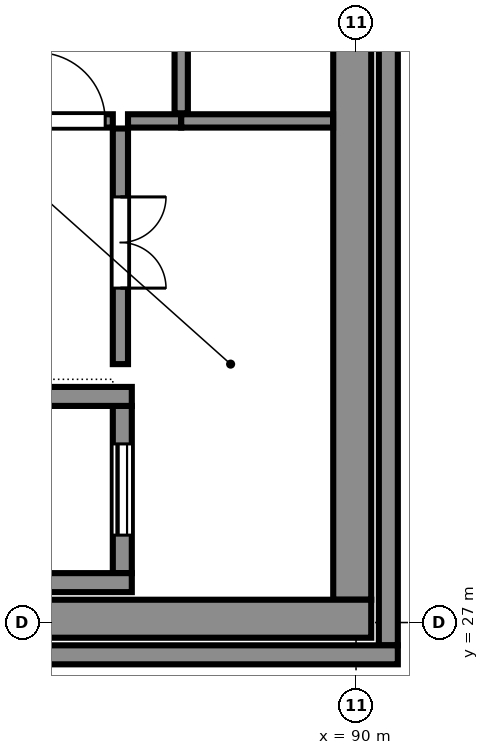
"""IFC4 building model, lengths in metres.
Left out: names, types, materials, properties, quantities, classifications, styles, units other than length and angle.
Written with IfcOpenShell. Run it as: python <this file> out.ifc"""

import sys

from ifc_helpers import new_model, si_unit, direction, frame, frame_2d, origin, place, context, subcontext, project, spatial, polyline, rectangle, outline, extrude, element, fill, save


model = new_model("IFC4")
c1 = context("Model", 3, precision=1e-05, world=origin(), true_north=direction((0.0, 1.0)))
c2 = subcontext(c1, "Body", "Model", "MODEL_VIEW")
j1 = project(units=[si_unit("LENGTHUNIT", "METRE"), si_unit("PLANEANGLEUNIT", "RADIAN")], contexts=[c1])
p1 = place(None, origin())
s1 = spatial("IfcSite", under=j1, at=p1, CompositionType="ELEMENT")
p2 = place(p1, origin())
s2 = spatial("IfcBuilding", under=s1, at=p2, CompositionType="ELEMENT")
p3 = place(p2, frame((0.0, 0.0, 11.7)))
s3 = spatial("IfcBuildingStorey", under=s2, at=p3, CompositionType="ELEMENT", Elevation=11.7)
p4 = place(p3, frame((71.8, 27.05, 0.0), z_axis=(0.0, 0.0, 1.0), x_axis=(1.0, 0.0, 0.0)))
e1 = element("IfcWall", 1, at=p4, inside=s3, PredefinedType="SOLIDWALL", context=c2, shape_type="SweptSolid", body=[
    extrude(rectangle(XDim=18.4, YDim=0.5, at=frame_2d((9.2, 0.0))), origin(), (0.0, 0.0, 1.0), 4.2),
])
p5 = place(p3, frame((89.95, 27.3, 0.0), z_axis=(0.0, 0.0, 1.0), x_axis=(0.0, 1.0, 0.0)))
e2 = element("IfcWall", 2, at=p5, inside=s3, PredefinedType="SOLIDWALL", context=c2, shape_type="SweptSolid", body=[
    extrude(rectangle(XDim=8.4, YDim=0.5, at=frame_2d((4.2, 0.0))), origin(), (0.0, 0.0, 1.0), 4.2),
])
p6 = place(p3, frame((71.45, 26.575, 0.0), z_axis=(0.0, 0.0, 1.0), x_axis=(1.0, 0.0, 0.0)))
e3 = element("IfcWall", 3, at=p6, inside=s3, PredefinedType="SOLIDWALL", context=c2, shape_type="SweptSolid", body=[
    extrude(outline(polyline([(0.0, 0.0), (19.1, 0.0), (19.1, 12.6), (0.0, 12.6), (0.0, 0.0)]), holes=[polyline([(1.308, 2.439), (1.352, 2.546), (1.408, 2.646), (1.475, 2.74), (1.552, 2.826), (1.638, 2.903), (1.732, 2.969), (1.833, 3.025), (1.939, 3.068), (2.05, 3.1), (2.161, 3.068), (2.267, 3.025), (2.368, 2.969), (2.462, 2.903), (2.549, 2.826), (2.625, 2.74), (2.692, 2.646), (2.748, 2.546), (2.792, 2.439), (2.824, 2.329), (2.844, 2.215), (2.85, 2.1), (2.85, 0.6), (1.25, 0.6), (1.25, 2.1), (1.257, 2.215), (1.276, 2.329), (1.308, 2.439)]), polyline([(4.308, 2.439), (4.352, 2.546), (4.408, 2.646), (4.475, 2.74), (4.552, 2.826), (4.638, 2.903), (4.732, 2.969), (4.833, 3.025), (4.939, 3.068), (5.05, 3.1), (5.161, 3.068), (5.267, 3.025), (5.368, 2.969), (5.462, 2.903), (5.549, 2.826), (5.625, 2.74), (5.692, 2.646), (5.748, 2.546), (5.792, 2.439), (5.824, 2.329), (5.844, 2.215), (5.85, 2.1), (5.85, 0.6), (4.25, 0.6), (4.25, 2.1), (4.257, 2.215), (4.276, 2.329), (4.308, 2.439)]), polyline([(7.308, 2.439), (7.352, 2.546), (7.408, 2.646), (7.475, 2.74), (7.552, 2.826), (7.638, 2.903), (7.732, 2.969), (7.833, 3.025), (7.939, 3.068), (8.05, 3.1), (8.161, 3.068), (8.267, 3.025), (8.368, 2.969), (8.462, 2.903), (8.549, 2.826), (8.625, 2.74), (8.692, 2.646), (8.748, 2.546), (8.792, 2.439), (8.824, 2.329), (8.844, 2.215), (8.85, 2.1), (8.85, 0.6), (7.25, 0.6), (7.25, 2.1), (7.257, 2.215), (7.276, 2.329), (7.308, 2.439)]), polyline([(1.308, 6.639), (1.352, 6.746), (1.408, 6.846), (1.475, 6.94), (1.552, 7.026), (1.638, 7.103), (1.732, 7.169), (1.833, 7.225), (1.939, 7.269), (2.05, 7.3), (2.161, 7.269), (2.267, 7.225), (2.368, 7.169), (2.462, 7.103), (2.549, 7.026), (2.625, 6.94), (2.692, 6.846), (2.748, 6.746), (2.792, 6.639), (2.824, 6.529), (2.844, 6.415), (2.85, 6.3), (2.85, 4.8), (1.25, 4.8), (1.25, 6.3), (1.257, 6.415), (1.276, 6.529), (1.308, 6.639)]), polyline([(4.308, 6.639), (4.352, 6.746), (4.408, 6.846), (4.475, 6.94), (4.552, 7.026), (4.638, 7.103), (4.732, 7.169), (4.833, 7.225), (4.939, 7.269), (5.05, 7.3), (5.161, 7.269), (5.267, 7.225), (5.368, 7.169), (5.462, 7.103), (5.549, 7.026), (5.625, 6.94), (5.692, 6.846), (5.748, 6.746), (5.792, 6.639), (5.824, 6.529), (5.844, 6.415), (5.85, 6.3), (5.85, 4.8), (4.25, 4.8), (4.25, 6.3), (4.257, 6.415), (4.276, 6.529), (4.308, 6.639)]), polyline([(7.308, 6.639), (7.352, 6.746), (7.408, 6.846), (7.475, 6.94), (7.552, 7.026), (7.638, 7.103), (7.732, 7.169), (7.833, 7.225), (7.939, 7.269), (8.05, 7.3), (8.161, 7.269), (8.267, 7.225), (8.368, 7.169), (8.462, 7.103), (8.549, 7.026), (8.625, 6.94), (8.692, 6.846), (8.748, 6.746), (8.792, 6.639), (8.824, 6.529), (8.844, 6.415), (8.85, 6.3), (8.85, 4.8), (7.25, 4.8), (7.25, 6.3), (7.257, 6.415), (7.276, 6.529), (7.308, 6.639)]), polyline([(1.308, 10.839), (1.352, 10.946), (1.408, 11.046), (1.475, 11.14), (1.552, 11.226), (1.638, 11.303), (1.732, 11.369), (1.833, 11.425), (1.939, 11.469), (2.05, 11.5), (2.161, 11.469), (2.267, 11.425), (2.368, 11.369), (2.462, 11.303), (2.549, 11.226), (2.625, 11.14), (2.692, 11.046), (2.748, 10.946), (2.792, 10.839), (2.824, 10.729), (2.844, 10.615), (2.85, 10.5), (2.85, 9.0), (1.25, 9.0), (1.25, 10.5), (1.257, 10.615), (1.276, 10.729), (1.308, 10.839)]), polyline([(4.352, 10.946), (4.408, 11.046), (4.475, 11.14), (4.552, 11.226), (4.638, 11.303), (4.732, 11.369), (4.833, 11.425), (4.939, 11.469), (5.05, 11.5), (5.161, 11.469), (5.267, 11.425), (5.368, 11.369), (5.462, 11.303), (5.549, 11.226), (5.625, 11.14), (5.692, 11.046), (5.748, 10.946), (5.792, 10.839), (5.824, 10.729), (5.844, 10.615), (5.85, 10.5), (5.85, 9.0), (4.25, 9.0), (4.25, 10.5), (4.257, 10.615), (4.276, 10.729), (4.308, 10.839), (4.352, 10.946)]), polyline([(7.352, 10.946), (7.408, 11.046), (7.475, 11.14), (7.552, 11.226), (7.638, 11.303), (7.732, 11.369), (7.833, 11.425), (7.939, 11.469), (8.05, 11.5), (8.161, 11.469), (8.267, 11.425), (8.368, 11.369), (8.462, 11.303), (8.549, 11.226), (8.625, 11.14), (8.692, 11.046), (8.748, 10.946), (8.792, 10.839), (8.824, 10.729), (8.844, 10.615), (8.85, 10.5), (8.85, 9.0), (7.25, 9.0), (7.25, 10.5), (7.257, 10.615), (7.276, 10.729), (7.308, 10.839), (7.352, 10.946)]), polyline([(10.308, 2.439), (10.352, 2.546), (10.408, 2.646), (10.475, 2.74), (10.552, 2.826), (10.638, 2.903), (10.732, 2.969), (10.833, 3.025), (10.939, 3.068), (11.05, 3.1), (11.161, 3.068), (11.267, 3.025), (11.368, 2.969), (11.462, 2.903), (11.549, 2.826), (11.625, 2.74), (11.692, 2.646), (11.748, 2.546), (11.792, 2.439), (11.824, 2.329), (11.844, 2.215), (11.85, 2.1), (11.85, 0.6), (10.25, 0.6), (10.25, 2.1), (10.257, 2.215), (10.276, 2.329), (10.308, 2.439)]), polyline([(13.308, 2.439), (13.352, 2.546), (13.408, 2.646), (13.475, 2.74), (13.552, 2.826), (13.638, 2.903), (13.732, 2.969), (13.833, 3.025), (13.939, 3.068), (14.05, 3.1), (14.161, 3.068), (14.267, 3.025), (14.368, 2.969), (14.462, 2.903), (14.549, 2.826), (14.625, 2.74), (14.692, 2.646), (14.748, 2.546), (14.792, 2.439), (14.824, 2.329), (14.844, 2.215), (14.85, 2.1), (14.85, 0.6), (13.25, 0.6), (13.25, 2.1), (13.257, 2.215), (13.276, 2.329), (13.308, 2.439)]), polyline([(16.308, 2.439), (16.352, 2.546), (16.408, 2.646), (16.475, 2.74), (16.552, 2.826), (16.638, 2.903), (16.732, 2.969), (16.833, 3.025), (16.939, 3.068), (17.05, 3.1), (17.161, 3.068), (17.267, 3.025), (17.368, 2.969), (17.462, 2.903), (17.549, 2.826), (17.625, 2.74), (17.692, 2.646), (17.748, 2.546), (17.792, 2.439), (17.824, 2.329), (17.844, 2.215), (17.85, 2.1), (17.85, 0.6), (16.25, 0.6), (16.25, 2.1), (16.257, 2.215), (16.276, 2.329), (16.308, 2.439)]), polyline([(10.308, 6.639), (10.352, 6.746), (10.408, 6.846), (10.475, 6.94), (10.552, 7.026), (10.638, 7.103), (10.732, 7.169), (10.833, 7.225), (10.939, 7.269), (11.05, 7.3), (11.161, 7.269), (11.267, 7.225), (11.368, 7.169), (11.462, 7.103), (11.549, 7.026), (11.625, 6.94), (11.692, 6.846), (11.748, 6.746), (11.792, 6.639), (11.824, 6.529), (11.844, 6.415), (11.85, 6.3), (11.85, 4.8), (10.25, 4.8), (10.25, 6.3), (10.257, 6.415), (10.276, 6.529), (10.308, 6.639)]), polyline([(13.308, 6.639), (13.352, 6.746), (13.408, 6.846), (13.475, 6.94), (13.552, 7.026), (13.638, 7.103), (13.732, 7.169), (13.833, 7.225), (13.939, 7.269), (14.05, 7.3), (14.161, 7.269), (14.267, 7.225), (14.368, 7.169), (14.462, 7.103), (14.549, 7.026), (14.625, 6.94), (14.692, 6.846), (14.748, 6.746), (14.792, 6.639), (14.824, 6.529), (14.844, 6.415), (14.85, 6.3), (14.85, 4.8), (13.25, 4.8), (13.25, 6.3), (13.257, 6.415), (13.276, 6.529), (13.308, 6.639)]), polyline([(16.308, 6.639), (16.352, 6.746), (16.408, 6.846), (16.475, 6.94), (16.552, 7.026), (16.638, 7.103), (16.732, 7.169), (16.833, 7.225), (16.939, 7.269), (17.05, 7.3), (17.161, 7.269), (17.267, 7.225), (17.368, 7.169), (17.462, 7.103), (17.549, 7.026), (17.625, 6.94), (17.692, 6.846), (17.748, 6.746), (17.792, 6.639), (17.824, 6.529), (17.844, 6.415), (17.85, 6.3), (17.85, 4.8), (16.25, 4.8), (16.25, 6.3), (16.257, 6.415), (16.276, 6.529), (16.308, 6.639)]), polyline([(10.308, 10.839), (10.352, 10.946), (10.408, 11.046), (10.475, 11.14), (10.552, 11.226), (10.638, 11.303), (10.732, 11.369), (10.833, 11.425), (10.939, 11.469), (11.05, 11.5), (11.161, 11.469), (11.267, 11.425), (11.368, 11.369), (11.462, 11.303), (11.549, 11.226), (11.625, 11.14), (11.692, 11.046), (11.748, 10.946), (11.792, 10.839), (11.824, 10.729), (11.844, 10.615), (11.85, 10.5), (11.85, 9.0), (10.25, 9.0), (10.25, 10.5), (10.257, 10.615), (10.276, 10.729), (10.308, 10.839)]), polyline([(13.352, 10.946), (13.408, 11.046), (13.475, 11.14), (13.552, 11.226), (13.638, 11.303), (13.732, 11.369), (13.833, 11.425), (13.939, 11.469), (14.05, 11.5), (14.161, 11.469), (14.267, 11.425), (14.368, 11.369), (14.462, 11.303), (14.549, 11.226), (14.625, 11.14), (14.692, 11.046), (14.748, 10.946), (14.792, 10.839), (14.824, 10.729), (14.844, 10.615), (14.85, 10.5), (14.85, 9.0), (13.25, 9.0), (13.25, 10.5), (13.257, 10.615), (13.276, 10.729), (13.308, 10.839), (13.352, 10.946)]), polyline([(16.352, 10.946), (16.408, 11.046), (16.475, 11.14), (16.552, 11.226), (16.638, 11.303), (16.732, 11.369), (16.833, 11.425), (16.939, 11.469), (17.05, 11.5), (17.161, 11.469), (17.267, 11.425), (17.368, 11.369), (17.462, 11.303), (17.549, 11.226), (17.625, 11.14), (17.692, 11.046), (17.748, 10.946), (17.792, 10.839), (17.824, 10.729), (17.844, 10.615), (17.85, 10.5), (17.85, 9.0), (16.25, 9.0), (16.25, 10.5), (16.257, 10.615), (16.276, 10.729), (16.308, 10.839), (16.352, 10.946)])]), frame((0.0, 0.125, 0.0), z_axis=(0.0, -1.0, 0.0), x_axis=(1.0, 0.0, 0.0)), (0.0, 0.0, 1.0), 0.25),
])
p7 = place(p3, frame((90.425, 26.7, 0.0), z_axis=(0.0, 0.0, 1.0), x_axis=(0.0, 1.0, 0.0)))
e4 = element("IfcWall", 4, at=p7, inside=s3, PredefinedType="SOLIDWALL", context=c2, shape_type="SweptSolid", body=[
    extrude(outline(polyline([(0.0, 0.0), (8.7, 0.0), (8.7, 12.6), (0.0, 12.6), (0.0, 0.0)]), holes=[polyline([(2.056, 2.215), (2.076, 2.329), (2.108, 2.439), (2.152, 2.546), (2.208, 2.646), (2.275, 2.74), (2.352, 2.826), (2.438, 2.903), (2.532, 2.969), (2.633, 3.025), (2.739, 3.068), (2.85, 3.1), (2.961, 3.068), (3.067, 3.025), (3.168, 2.969), (3.262, 2.903), (3.348, 2.826), (3.425, 2.74), (3.492, 2.646), (3.548, 2.546), (3.592, 2.439), (3.624, 2.329), (3.644, 2.215), (3.65, 2.1), (3.65, 0.6), (2.05, 0.6), (2.05, 2.1), (2.056, 2.215)]), polyline([(5.076, 2.329), (5.108, 2.439), (5.152, 2.546), (5.208, 2.646), (5.275, 2.74), (5.352, 2.826), (5.438, 2.903), (5.532, 2.969), (5.633, 3.025), (5.739, 3.068), (5.85, 3.1), (5.961, 3.068), (6.067, 3.025), (6.168, 2.969), (6.262, 2.903), (6.348, 2.826), (6.425, 2.74), (6.492, 2.646), (6.548, 2.546), (6.592, 2.439), (6.624, 2.329), (6.644, 2.215), (6.65, 2.1), (6.65, 0.6), (5.05, 0.6), (5.05, 2.1), (5.056, 2.215), (5.076, 2.329)]), polyline([(2.076, 6.529), (2.108, 6.639), (2.152, 6.746), (2.208, 6.846), (2.275, 6.94), (2.352, 7.026), (2.438, 7.103), (2.532, 7.169), (2.633, 7.225), (2.739, 7.269), (2.85, 7.3), (2.961, 7.269), (3.067, 7.225), (3.168, 7.169), (3.262, 7.103), (3.348, 7.026), (3.425, 6.94), (3.492, 6.846), (3.548, 6.746), (3.592, 6.639), (3.624, 6.529), (3.644, 6.415), (3.65, 6.3), (3.65, 4.8), (2.05, 4.8), (2.05, 6.3), (2.056, 6.415), (2.076, 6.529)]), polyline([(5.056, 6.415), (5.076, 6.529), (5.108, 6.639), (5.152, 6.746), (5.208, 6.846), (5.275, 6.94), (5.352, 7.026), (5.438, 7.103), (5.532, 7.169), (5.633, 7.225), (5.739, 7.269), (5.85, 7.3), (5.961, 7.269), (6.067, 7.225), (6.168, 7.169), (6.262, 7.103), (6.348, 7.026), (6.425, 6.94), (6.492, 6.846), (6.548, 6.746), (6.592, 6.639), (6.624, 6.529), (6.644, 6.415), (6.65, 6.3), (6.65, 4.8), (5.05, 4.8), (5.05, 6.3), (5.056, 6.415)]), polyline([(2.076, 10.729), (2.108, 10.839), (2.152, 10.946), (2.208, 11.046), (2.275, 11.14), (2.352, 11.226), (2.438, 11.303), (2.532, 11.369), (2.633, 11.425), (2.739, 11.469), (2.85, 11.5), (2.961, 11.469), (3.067, 11.425), (3.168, 11.369), (3.262, 11.303), (3.348, 11.226), (3.425, 11.14), (3.492, 11.046), (3.548, 10.946), (3.592, 10.839), (3.624, 10.729), (3.644, 10.615), (3.65, 10.5), (3.65, 9.0), (2.05, 9.0), (2.05, 10.5), (2.056, 10.615), (2.076, 10.729)]), polyline([(5.076, 10.729), (5.108, 10.839), (5.152, 10.946), (5.208, 11.046), (5.275, 11.14), (5.352, 11.226), (5.438, 11.303), (5.532, 11.369), (5.633, 11.425), (5.739, 11.469), (5.85, 11.5), (5.961, 11.469), (6.067, 11.425), (6.168, 11.369), (6.262, 11.303), (6.348, 11.226), (6.425, 11.14), (6.492, 11.046), (6.548, 10.946), (6.592, 10.839), (6.624, 10.729), (6.644, 10.615), (6.65, 10.5), (6.65, 9.0), (5.05, 9.0), (5.05, 10.5), (5.056, 10.615), (5.076, 10.729)])]), frame((0.0, 0.125, 0.0), z_axis=(0.0, -1.0, 0.0), x_axis=(1.0, 0.0, 0.0)), (0.0, 0.0, 1.0), 0.25),
])
for number, where, z_axis, x_axis in (
    (5, (83.65, 27.525, 0.0), (0.0, 0.0, 1.0), (1.0, 0.0, 0.0)),
    (6, (83.65, 29.975, 0.0), (0.0, 0.0, 1.0), (1.0, 0.0, 0.0)),
):
    element("IfcWall", number, at=place(p3, frame(where, z_axis=z_axis, x_axis=x_axis)), inside=s3, PredefinedType="SOLIDWALL", context=c2, shape_type="SweptSolid", body=[
        extrude(rectangle(XDim=3.4, YDim=0.25, at=frame_2d((1.7, 0.0))), origin(), (0.0, 0.0, 1.0), 3.516),
    ])
p8 = place(p3, frame((86.925, 27.65, 0.0), z_axis=(0.0, 0.0, 1.0), x_axis=(0.0, 1.0, 0.0)))
e7 = element("IfcWall", 7, at=p8, inside=s3, PredefinedType="SOLIDWALL", context=c2, shape_type="SweptSolid", body=[
    extrude(rectangle(XDim=2.2, YDim=0.25, at=frame_2d((1.1, 0.0))), origin(), (0.0, 0.0, 1.0), 3.516),
])
p9 = place(p8, frame((0.5, 0.0, 0.0)))
e8 = element("IfcOpeningElement", 8, at=p9, cuts=e7, PredefinedType="OPENING", context=c2, shape_type="SweptSolid", body=[
    extrude(rectangle(XDim=1.2, YDim=2.1, at=frame_2d((0.6, 1.05))), frame((0.0, 0.135, 0.0), z_axis=(0.0, -1.0, 0.0), x_axis=(1.0, 0.0, 0.0)), (0.0, 0.0, 1.0), 0.27),
])
p10 = place(p3, frame((86.9, 33.5, 0.0), z_axis=(0.0, 0.0, 1.0), x_axis=(0.0, -1.0, 0.0)))
e9 = element("IfcWall", 9, at=p10, inside=s3, PredefinedType="PARTITIONING", context=c2, shape_type="SweptSolid", body=[
    extrude(rectangle(XDim=3.1, YDim=0.2, at=frame_2d((1.55, 0.0))), origin(), (0.0, 0.0, 1.0), 3.382),
])
p11 = place(p10, frame((0.9, 0.0, 0.0)))
e10 = element("IfcOpeningElement", 10, at=p11, cuts=e9, PredefinedType="OPENING", context=c2, shape_type="SweptSolid", body=[
    extrude(rectangle(XDim=1.2, YDim=2.1, at=frame_2d((0.6, 1.05))), frame((0.0, 0.11, 0.0), z_axis=(0.0, -1.0, 0.0), x_axis=(1.0, 0.0, 0.0)), (0.0, 0.0, 1.0), 0.22),
])
p12 = place(p3, frame((85.7, 33.6, 0.0), z_axis=(0.0, 0.0, 1.0), x_axis=(1.0, 0.0, 0.0)))
e11 = element("IfcWall", 11, at=p12, inside=s3, PredefinedType="PARTITIONING", context=c2, shape_type="SweptSolid", body=[
    extrude(rectangle(XDim=1.1, YDim=0.175, at=frame_2d((0.55, 0.0))), origin(), (0.0, 0.0, 1.0), 3.307),
])
p13 = place(p12, frame((0.1, 0.0, 0.0)))
e12 = element("IfcOpeningElement", 12, at=p13, cuts=e11, PredefinedType="OPENING", context=c2, shape_type="SweptSolid", body=[
    extrude(rectangle(XDim=0.9, YDim=2.1, at=frame_2d((0.45, 1.05))), frame((0.0, 0.097, 0.0), z_axis=(0.0, -1.0, 0.0), x_axis=(1.0, 0.0, 0.0)), (0.0, 0.0, 1.0), 0.195),
])
p14 = place(p3, frame((87.0, 33.6, 0.0), z_axis=(0.0, 0.0, 1.0), x_axis=(1.0, 0.0, 0.0)))
e13 = element("IfcWall", 13, at=p14, inside=s3, PredefinedType="PARTITIONING", context=c2, shape_type="SweptSolid", body=[
    extrude(rectangle(XDim=0.7, YDim=0.175, at=frame_2d((0.35, 0.0))), origin(), (0.0, 0.0, 1.0), 3.307),
])
for number, where, z_axis, x_axis in (
    (14, (87.7, 33.6, 0.0), (0.0, 0.0, 1.0), (1.0, 0.0, 0.0)),
    (15, (87.7, 35.698, 0.0), (0.0, 0.0, 1.0), (0.0, -1.0, 0.0)),
):
    element("IfcWall", number, at=place(p3, frame(where, z_axis=z_axis, x_axis=x_axis)), inside=s3, PredefinedType="PARTITIONING", context=c2, shape_type="SweptSolid", body=[
        extrude(rectangle(XDim=1.998, YDim=0.175, at=frame_2d((0.999, 0.0))), origin(), (0.0, 0.0, 1.0), 3.307),
    ])
p15 = place(p9, origin())
e16 = element("IfcDoor", 16, at=p15, inside=s3, OperationType="SLIDING_TO_LEFT", PredefinedType="DOOR", context=c2, shape_type="SweptSolid", body=[
    extrude(outline(polyline([(0.0, 0.0), (0.07, 0.0), (0.07, 2.03), (1.13, 2.03), (1.13, 0.0), (1.2, 0.0), (1.2, 2.1), (0.0, 2.1), (0.0, 0.0)])), frame((0.0, 0.025, 0.0), z_axis=(0.0, -1.0, 0.0), x_axis=(1.0, 0.0, 0.0)), (0.0, 0.0, 1.0), 0.05),
    extrude(rectangle(XDim=0.579, YDim=2.016, at=frame_2d((0.363, 1.018))), frame((0.0, 0.018, 0.0), z_axis=(0.0, -1.0, 0.0), x_axis=(1.0, 0.0, 0.0)), (0.0, 0.0, 1.0), 0.016),
    extrude(rectangle(XDim=0.575, YDim=2.016, at=frame_2d((0.839, 1.018))), frame((0.0, -0.002, 0.0), z_axis=(0.0, -1.0, 0.0), x_axis=(1.0, 0.0, 0.0)), (0.0, 0.0, 1.0), 0.016),
])
fill(e8, e16)
p16 = place(p11, origin())
e17 = element("IfcDoor", 17, at=p16, inside=s3, OperationType="DOUBLE_DOOR_SINGLE_SWING", PredefinedType="DOOR", context=c2, shape_type="SweptSolid", body=[
    extrude(outline(polyline([(0.0, 0.0), (0.07, 0.0), (0.07, 2.03), (1.13, 2.03), (1.13, 0.0), (1.2, 0.0), (1.2, 2.1), (0.0, 2.1), (0.0, 0.0)])), frame((0.0, 0.025, 0.0), z_axis=(0.0, -1.0, 0.0), x_axis=(1.0, 0.0, 0.0)), (0.0, 0.0, 1.0), 0.05),
    extrude(outline(polyline([(0.074, 0.01), (0.597, 0.01), (0.597, 2.026), (0.074, 2.026), (0.074, 0.01)]), holes=[polyline([(0.178, 0.373), (0.492, 0.373), (0.492, 1.784), (0.178, 1.784), (0.178, 0.373)])]), frame((0.0, 0.017, 0.0), z_axis=(0.0, -1.0, 0.0), x_axis=(1.0, 0.0, 0.0)), (0.0, 0.0, 1.0), 0.035),
    extrude(rectangle(XDim=0.314, YDim=1.411, at=frame_2d((0.335, 1.079))), frame((0.0, 0.009, 0.0), z_axis=(0.0, -1.0, 0.0), x_axis=(1.0, 0.0, 0.0)), (0.0, 0.0, 1.0), 0.017),
    extrude(outline(polyline([(0.603, 0.01), (1.126, 0.01), (1.126, 2.026), (0.603, 2.026), (0.603, 0.01)]), holes=[polyline([(0.708, 0.373), (1.021, 0.373), (1.021, 1.784), (0.708, 1.784), (0.708, 0.373)])]), frame((0.0, 0.017, 0.0), z_axis=(0.0, -1.0, 0.0), x_axis=(1.0, 0.0, 0.0)), (0.0, 0.0, 1.0), 0.035),
    extrude(rectangle(XDim=0.314, YDim=1.411, at=frame_2d((0.865, 1.079))), frame((0.0, 0.009, 0.0), z_axis=(0.0, -1.0, 0.0), x_axis=(1.0, 0.0, 0.0)), (0.0, 0.0, 1.0), 0.017),
])
fill(e10, e17)
p17 = place(p13, origin())
e18 = element("IfcDoor", 18, at=p17, inside=s3, OperationType="SINGLE_SWING_LEFT", PredefinedType="DOOR", context=c2, shape_type="SweptSolid", body=[
    extrude(outline(polyline([(0.0, 0.0), (0.07, 0.0), (0.07, 2.03), (0.83, 2.03), (0.83, 0.0), (0.9, 0.0), (0.9, 2.1), (0.0, 2.1), (0.0, 0.0)])), frame((0.0, 0.025, 0.0), z_axis=(0.0, -1.0, 0.0), x_axis=(1.0, 0.0, 0.0)), (0.0, 0.0, 1.0), 0.05),
    extrude(outline(polyline([(0.074, 0.01), (0.826, 0.01), (0.826, 2.026), (0.074, 2.026), (0.074, 0.01)]), holes=[polyline([(0.194, 0.16), (0.706, 0.16), (0.706, 1.01), (0.194, 1.01), (0.194, 0.16)]), polyline([(0.3, 1.16), (0.6, 1.16), (0.6, 1.76), (0.3, 1.76), (0.3, 1.16)])]), frame((0.0, 0.017, 0.0), z_axis=(0.0, -1.0, 0.0), x_axis=(1.0, 0.0, 0.0)), (0.0, 0.0, 1.0), 0.035),
    extrude(rectangle(XDim=0.512, YDim=0.85, at=frame_2d((0.45, 0.585))), frame((0.0, 0.009, 0.0), z_axis=(0.0, -1.0, 0.0), x_axis=(1.0, 0.0, 0.0)), (0.0, 0.0, 1.0), 0.017),
    extrude(rectangle(XDim=0.3, YDim=0.6, at=frame_2d((0.45, 1.46))), frame((0.0, 0.006, 0.0), z_axis=(0.0, -1.0, 0.0), x_axis=(1.0, 0.0, 0.0)), (0.0, 0.0, 1.0), 0.012),
])
fill(e12, e18)
save(model, sys.argv[1])
